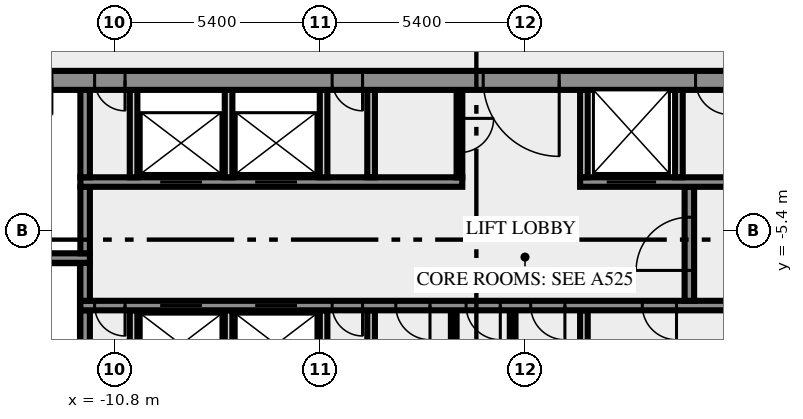
"""IFC4 building model, lengths in metres.
Left out: names, types, materials, properties, quantities, classifications, styles, units other than length and angle.
Written with IfcOpenShell. Run it as: python <this file> out.ifc"""

import sys

from ifc_helpers import new_model, si_unit, direction, frame, frame_2d, origin, place, context, subcontext, project, spatial, rectangle, extrude, element, fill, save


model = new_model("IFC4")
c1 = context("Model", 3, precision=1e-05, world=origin(), true_north=direction((0.0, 1.0)))
c2 = subcontext(c1, "Body", "Model", "MODEL_VIEW")
j1 = project(units=[si_unit("LENGTHUNIT", "METRE"), si_unit("PLANEANGLEUNIT", "RADIAN")], contexts=[c1])
p1 = place(None, origin())
s1 = spatial("IfcSite", under=j1, at=p1, CompositionType="ELEMENT")
p2 = place(p1, origin())
s2 = spatial("IfcBuilding", under=s1, at=p2, CompositionType="ELEMENT")
p3 = place(p2, frame((0.0, 0.0, 339.0)))
s3 = spatial("IfcBuildingStorey", under=s2, at=p3, CompositionType="ELEMENT", Elevation=339.0)
p4 = place(p3, frame((-11.575, -10.5, 0.0), z_axis=(0.0, 0.0, 1.0), x_axis=(0.0, 1.0, 0.0)))
e1 = element("IfcWall", 1, at=p4, inside=s3, PredefinedType="SHEAR", context=c2, shape_type="SweptSolid", body=[
    extrude(rectangle(XDim=3.0, YDim=0.25, at=frame_2d((1.5, 0.0))), origin(), (0.0, 0.0, 1.0), 3.65),
])
for number, where, z_axis, x_axis in (
    (2, (-10.3, -10.5, 0.0), (0.0, 0.0, 1.0), (0.0, 1.0, 0.0)),
    (3, (-7.8, -10.5, 0.0), (0.0, 0.0, 1.0), (0.0, 1.0, 0.0)),
    (4, (-5.3, -10.5, 0.0), (0.0, 0.0, 1.0), (0.0, 1.0, 0.0)),
    (5, (-4.05, -10.5, 0.0), (0.0, 0.0, 1.0), (0.0, 1.0, 0.0)),
):
    element("IfcWall", number, at=place(p3, frame(where, z_axis=z_axis, x_axis=x_axis)), inside=s3, PredefinedType="SOLIDWALL", context=c2, shape_type="SweptSolid", body=[
        extrude(rectangle(XDim=3.0, YDim=0.2, at=frame_2d((1.5, 0.0))), origin(), (0.0, 0.0, 1.0), 3.65),
    ])
for number, where, z_axis, x_axis in (
    (6, (-1.875, -10.5, 0.0), (0.0, 0.0, 1.0), (0.0, 1.0, 0.0)),
    (7, (-0.325, -10.5, 0.0), (0.0, 0.0, 1.0), (0.0, 1.0, 0.0)),
):
    element("IfcWall", number, at=place(p3, frame(where, z_axis=z_axis, x_axis=x_axis)), inside=s3, PredefinedType="PARTITIONING", context=c2, shape_type="SweptSolid", body=[
        extrude(rectangle(XDim=3.0, YDim=0.15, at=frame_2d((1.5, 0.0))), origin(), (0.0, 0.0, 1.0), 3.65),
    ])
p5 = place(p3, frame((1.55, -10.5, 0.0), z_axis=(0.0, 0.0, 1.0), x_axis=(0.0, 1.0, 0.0)))
e8 = element("IfcWall", 8, at=p5, inside=s3, PredefinedType="SOLIDWALL", context=c2, shape_type="SweptSolid", body=[
    extrude(rectangle(XDim=3.0, YDim=0.2, at=frame_2d((1.5, 0.0))), origin(), (0.0, 0.0, 1.0), 3.65),
])
p6 = place(p3, frame((11.7, -7.375, 0.0), z_axis=(0.0, 0.0, 1.0), x_axis=(-1.0, 0.0, 0.0)))
e9 = element("IfcWall", 9, at=p6, inside=s3, PredefinedType="SHEAR", context=c2, shape_type="SweptSolid", body=[
    extrude(rectangle(XDim=23.4, YDim=0.25, at=frame_2d((11.7, 0.0))), origin(), (0.0, 0.0, 1.0), 3.65),
])
p7 = place(p6, frame((22.225, 0.0, 0.0)))
e10 = element("IfcOpeningElement", 10, at=p7, cuts=e9, PredefinedType="OPENING", context=c2, shape_type="SweptSolid", body=[
    extrude(rectangle(XDim=0.8, YDim=2.1, at=frame_2d((0.4, 1.05))), frame((0.0, 0.135, 0.0), z_axis=(0.0, -1.0, 0.0), x_axis=(1.0, 0.0, 0.0)), (0.0, 0.0, 1.0), 0.27),
])
p8 = place(p6, frame((20.2, 0.0, 0.0)))
e11 = element("IfcOpeningElement", 11, at=p8, cuts=e9, PredefinedType="OPENING", context=c2, shape_type="SweptSolid", body=[
    extrude(rectangle(XDim=1.1, YDim=2.1, at=frame_2d((0.55, 1.05))), frame((0.0, 0.135, 0.0), z_axis=(0.0, -1.0, 0.0), x_axis=(1.0, 0.0, 0.0)), (0.0, 0.0, 1.0), 0.27),
])
p9 = place(p6, frame((17.7, 0.0, 0.0)))
e12 = element("IfcOpeningElement", 12, at=p9, cuts=e9, PredefinedType="OPENING", context=c2, shape_type="SweptSolid", body=[
    extrude(rectangle(XDim=1.1, YDim=2.1, at=frame_2d((0.55, 1.05))), frame((0.0, 0.135, 0.0), z_axis=(0.0, -1.0, 0.0), x_axis=(1.0, 0.0, 0.0)), (0.0, 0.0, 1.0), 0.27),
])
p10 = place(p6, frame((15.975, 0.0, 0.0)))
e13 = element("IfcOpeningElement", 13, at=p10, cuts=e9, PredefinedType="OPENING", context=c2, shape_type="SweptSolid", body=[
    extrude(rectangle(XDim=0.8, YDim=2.1, at=frame_2d((0.4, 1.05))), frame((0.0, 0.135, 0.0), z_axis=(0.0, -1.0, 0.0), x_axis=(1.0, 0.0, 0.0)), (0.0, 0.0, 1.0), 0.27),
])
p11 = place(p6, frame((14.2, 0.0, 0.0)))
e14 = element("IfcOpeningElement", 14, at=p11, cuts=e9, PredefinedType="OPENING", context=c2, shape_type="SweptSolid", body=[
    extrude(rectangle(XDim=0.9, YDim=2.1, at=frame_2d((0.45, 1.05))), frame((0.0, 0.135, 0.0), z_axis=(0.0, -1.0, 0.0), x_axis=(1.0, 0.0, 0.0)), (0.0, 0.0, 1.0), 0.27),
])
p12 = place(p6, frame((12.35, 0.0, 0.0)))
e15 = element("IfcOpeningElement", 15, at=p12, cuts=e9, PredefinedType="OPENING", context=c2, shape_type="SweptSolid", body=[
    extrude(rectangle(XDim=0.9, YDim=2.1, at=frame_2d((0.45, 1.05))), frame((0.0, 0.135, 0.0), z_axis=(0.0, -1.0, 0.0), x_axis=(1.0, 0.0, 0.0)), (0.0, 0.0, 1.0), 0.27),
])
p13 = place(p6, frame((10.65, 0.0, 0.0)))
e16 = element("IfcOpeningElement", 16, at=p13, cuts=e9, PredefinedType="OPENING", context=c2, shape_type="SweptSolid", body=[
    extrude(rectangle(XDim=0.9, YDim=2.1, at=frame_2d((0.45, 1.05))), frame((0.0, 0.135, 0.0), z_axis=(0.0, -1.0, 0.0), x_axis=(1.0, 0.0, 0.0)), (0.0, 0.0, 1.0), 0.27),
])
p14 = place(p6, frame((7.713, 0.0, 0.0)))
e17 = element("IfcOpeningElement", 17, at=p14, cuts=e9, PredefinedType="OPENING", context=c2, shape_type="SweptSolid", body=[
    extrude(rectangle(XDim=0.9, YDim=2.1, at=frame_2d((0.45, 1.05))), frame((0.0, 0.135, 0.0), z_axis=(0.0, -1.0, 0.0), x_axis=(1.0, 0.0, 0.0)), (0.0, 0.0, 1.0), 0.27),
])
p15 = place(p6, frame((4.15, 0.0, 0.0)))
e18 = element("IfcOpeningElement", 18, at=p15, cuts=e9, PredefinedType="OPENING", context=c2, shape_type="SweptSolid", body=[
    extrude(rectangle(XDim=0.9, YDim=2.1, at=frame_2d((0.45, 1.05))), frame((0.0, 0.135, 0.0), z_axis=(0.0, -1.0, 0.0), x_axis=(1.0, 0.0, 0.0)), (0.0, 0.0, 1.0), 0.27),
])
p16 = place(p6, frame((1.138, 0.0, 0.0)))
e19 = element("IfcOpeningElement", 19, at=p16, cuts=e9, PredefinedType="OPENING", context=c2, shape_type="SweptSolid", body=[
    extrude(rectangle(XDim=0.9, YDim=2.1, at=frame_2d((0.45, 1.05))), frame((0.0, 0.135, 0.0), z_axis=(0.0, -1.0, 0.0), x_axis=(1.0, 0.0, 0.0)), (0.0, 0.0, 1.0), 0.27),
])
p17 = place(p3, frame((-11.575, -7.25, 0.0), z_axis=(0.0, 0.0, 1.0), x_axis=(0.0, 1.0, 0.0)))
e20 = element("IfcWall", 20, at=p17, inside=s3, PredefinedType="SHEAR", context=c2, shape_type="SweptSolid", body=[
    extrude(rectangle(XDim=1.0, YDim=0.25, at=frame_2d((0.5, 0.0))), origin(), (0.0, 0.0, 1.0), 3.65),
])
p18 = place(p3, frame((4.325, -7.25, 0.0), z_axis=(0.0, 0.0, 1.0), x_axis=(0.0, 1.0, 0.0)))
e21 = element("IfcWall", 21, at=p18, inside=s3, PredefinedType="SHEAR", context=c2, shape_type="SweptSolid", body=[
    extrude(rectangle(XDim=3.0, YDim=0.25, at=frame_2d((1.5, 0.0))), origin(), (0.0, 0.0, 1.0), 3.65),
])
p19 = place(p18, frame((0.8, 0.0, 0.0)))
e22 = element("IfcOpeningElement", 22, at=p19, cuts=e21, PredefinedType="OPENING", context=c2, shape_type="SweptSolid", body=[
    extrude(rectangle(XDim=1.4, YDim=2.1, at=frame_2d((0.7, 1.05))), frame((0.0, 0.135, 0.0), z_axis=(0.0, -1.0, 0.0), x_axis=(1.0, 0.0, 0.0)), (0.0, 0.0, 1.0), 0.27),
])
p20 = place(p3, frame((-11.45, -6.125, 0.0), z_axis=(0.0, 0.0, 1.0), x_axis=(-1.0, 0.0, 0.0)))
e23 = element("IfcWall", 23, at=p20, inside=s3, PredefinedType="SHEAR", context=c2, shape_type="SweptSolid", body=[
    extrude(rectangle(XDim=8.05, YDim=0.25, at=frame_2d((4.025, 0.0))), origin(), (0.0, 0.0, 1.0), 3.65),
])
p21 = place(p20, frame((6.2, 0.0, 0.0)))
e24 = element("IfcOpeningElement", 24, at=p21, cuts=e23, PredefinedType="OPENING", context=c2, shape_type="SweptSolid", body=[
    extrude(rectangle(XDim=1.8, YDim=2.1, at=frame_2d((0.9, 1.05))), frame((0.0, 0.135, 0.0), z_axis=(0.0, -1.0, 0.0), x_axis=(1.0, 0.0, 0.0)), (0.0, 0.0, 1.0), 0.27),
])
p22 = place(p3, frame((-11.575, -6.0, 0.0), z_axis=(0.0, 0.0, 1.0), x_axis=(0.0, 1.0, 0.0)))
e25 = element("IfcWall", 25, at=p22, inside=s3, PredefinedType="SHEAR", context=c2, shape_type="SweptSolid", body=[
    extrude(rectangle(XDim=1.75, YDim=0.25, at=frame_2d((0.875, 0.0))), origin(), (0.0, 0.0, 1.0), 3.65),
])
p23 = place(p3, frame((-11.7, -4.125, 0.0), z_axis=(0.0, 0.0, 1.0), x_axis=(1.0, 0.0, 0.0)))
e26 = element("IfcWall", 26, at=p23, inside=s3, PredefinedType="SHEAR", context=c2, shape_type="SweptSolid", body=[
    extrude(rectangle(XDim=10.05, YDim=0.25, at=frame_2d((5.025, 0.0))), origin(), (0.0, 0.0, 1.0), 3.65),
])
p24 = place(p23, frame((2.1, 0.0, 0.0)))
e27 = element("IfcOpeningElement", 27, at=p24, cuts=e26, PredefinedType="OPENING", context=c2, shape_type="SweptSolid", body=[
    extrude(rectangle(XDim=1.1, YDim=2.1, at=frame_2d((0.55, 1.05))), frame((0.0, 0.135, 0.0), z_axis=(0.0, -1.0, 0.0), x_axis=(1.0, 0.0, 0.0)), (0.0, 0.0, 1.0), 0.27),
])
p25 = place(p23, frame((4.6, 0.0, 0.0)))
e28 = element("IfcOpeningElement", 28, at=p25, cuts=e26, PredefinedType="OPENING", context=c2, shape_type="SweptSolid", body=[
    extrude(rectangle(XDim=1.1, YDim=2.1, at=frame_2d((0.55, 1.05))), frame((0.0, 0.135, 0.0), z_axis=(0.0, -1.0, 0.0), x_axis=(1.0, 0.0, 0.0)), (0.0, 0.0, 1.0), 0.27),
])
p26 = place(p3, frame((1.45, -4.125, 0.0), z_axis=(0.0, 0.0, 1.0), x_axis=(1.0, 0.0, 0.0)))
e29 = element("IfcWall", 29, at=p26, inside=s3, PredefinedType="SHEAR", context=c2, shape_type="SweptSolid", body=[
    extrude(rectangle(XDim=10.25, YDim=0.25, at=frame_2d((5.125, 0.0))), origin(), (0.0, 0.0, 1.0), 3.65),
])
p27 = place(p26, frame((0.7, 0.0, 0.0)))
e30 = element("IfcOpeningElement", 30, at=p27, cuts=e29, PredefinedType="OPENING", context=c2, shape_type="SweptSolid", body=[
    extrude(rectangle(XDim=1.3, YDim=2.1, at=frame_2d((0.65, 1.05))), frame((0.0, 0.135, 0.0), z_axis=(0.0, -1.0, 0.0), x_axis=(1.0, 0.0, 0.0)), (0.0, 0.0, 1.0), 0.27),
])
p28 = place(p3, frame((-11.575, -4.0, 0.0), z_axis=(0.0, 0.0, 1.0), x_axis=(0.0, 1.0, 0.0)))
e31 = element("IfcWall", 31, at=p28, inside=s3, PredefinedType="SHEAR", context=c2, shape_type="SweptSolid", body=[
    extrude(rectangle(XDim=2.3, YDim=0.25, at=frame_2d((1.15, 0.0))), origin(), (0.0, 0.0, 1.0), 3.65),
])
for number, where, z_axis, x_axis in (
    (32, (-10.3, -4.0, 0.0), (0.0, 0.0, 1.0), (0.0, 1.0, 0.0)),
    (33, (-7.8, -4.0, 0.0), (0.0, 0.0, 1.0), (0.0, 1.0, 0.0)),
    (34, (-5.3, -4.0, 0.0), (0.0, 0.0, 1.0), (0.0, 1.0, 0.0)),
    (35, (-4.05, -4.0, 0.0), (0.0, 0.0, 1.0), (0.0, 1.0, 0.0)),
):
    element("IfcWall", number, at=place(p3, frame(where, z_axis=z_axis, x_axis=x_axis)), inside=s3, PredefinedType="SOLIDWALL", context=c2, shape_type="SweptSolid", body=[
        extrude(rectangle(XDim=2.3, YDim=0.2, at=frame_2d((1.15, 0.0))), origin(), (0.0, 0.0, 1.0), 3.65),
    ])
p29 = place(p3, frame((-1.725, -1.7, 0.0), z_axis=(0.0, 0.0, 1.0), x_axis=(0.0, -1.0, 0.0)))
e36 = element("IfcWall", 36, at=p29, inside=s3, PredefinedType="PARTITIONING", context=c2, shape_type="SweptSolid", body=[
    extrude(rectangle(XDim=2.3, YDim=0.15, at=frame_2d((1.15, 0.0))), origin(), (0.0, 0.0, 1.0), 3.65),
])
p30 = place(p29, frame((0.75, 0.0, 0.0)))
e37 = element("IfcOpeningElement", 37, at=p30, cuts=e36, PredefinedType="OPENING", context=c2, shape_type="SweptSolid", body=[
    extrude(rectangle(XDim=0.9, YDim=2.1, at=frame_2d((0.45, 1.05))), frame((0.0, 0.085, 0.0), z_axis=(0.0, -1.0, 0.0), x_axis=(1.0, 0.0, 0.0)), (0.0, 0.0, 1.0), 0.17),
])
for number, where, z_axis, x_axis in (
    (38, (1.55, -4.0, 0.0), (0.0, 0.0, 1.0), (0.0, 1.0, 0.0)),
    (39, (4.05, -4.0, 0.0), (0.0, 0.0, 1.0), (0.0, 1.0, 0.0)),
):
    element("IfcWall", number, at=place(p3, frame(where, z_axis=z_axis, x_axis=x_axis)), inside=s3, PredefinedType="SOLIDWALL", context=c2, shape_type="SweptSolid", body=[
        extrude(rectangle(XDim=2.3, YDim=0.2, at=frame_2d((1.15, 0.0))), origin(), (0.0, 0.0, 1.0), 3.65),
    ])
p31 = place(p3, frame((20.49, -1.45, 0.0), z_axis=(0.0, 0.0, 1.0), x_axis=(-1.0, 0.0, 0.0)))
e40 = element("IfcWall", 40, at=p31, inside=s3, PredefinedType="SHEAR", context=c2, shape_type="SweptSolid", body=[
    extrude(rectangle(XDim=40.98, YDim=0.5, at=frame_2d((20.49, 0.0))), origin(), (0.0, 0.0, 1.0), 3.65),
])
p32 = place(p31, frame((38.14, 0.0, 0.0)))
e41 = element("IfcOpeningElement", 41, at=p32, cuts=e40, PredefinedType="OPENING", context=c2, shape_type="SweptSolid", body=[
    extrude(rectangle(XDim=1.8, YDim=2.1, at=frame_2d((0.9, 1.05))), frame((0.0, 0.26, 0.0), z_axis=(0.0, -1.0, 0.0), x_axis=(1.0, 0.0, 0.0)), (0.0, 0.0, 1.0), 0.52),
])
p33 = place(p31, frame((36.728, 0.0, 0.0)))
e42 = element("IfcOpeningElement", 42, at=p33, cuts=e40, PredefinedType="OPENING", context=c2, shape_type="SweptSolid", body=[
    extrude(rectangle(XDim=0.8, YDim=2.1, at=frame_2d((0.4, 1.05))), frame((0.0, 0.26, 0.0), z_axis=(0.0, -1.0, 0.0), x_axis=(1.0, 0.0, 0.0)), (0.0, 0.0, 1.0), 0.52),
])
p34 = place(p31, frame((35.153, 0.0, 0.0)))
e43 = element("IfcOpeningElement", 43, at=p34, cuts=e40, PredefinedType="OPENING", context=c2, shape_type="SweptSolid", body=[
    extrude(rectangle(XDim=0.8, YDim=2.1, at=frame_2d((0.4, 1.05))), frame((0.0, 0.26, 0.0), z_axis=(0.0, -1.0, 0.0), x_axis=(1.0, 0.0, 0.0)), (0.0, 0.0, 1.0), 0.52),
])
p35 = place(p31, frame((32.94, 0.0, 0.0)))
e44 = element("IfcOpeningElement", 44, at=p35, cuts=e40, PredefinedType="OPENING", context=c2, shape_type="SweptSolid", body=[
    extrude(rectangle(XDim=0.9, YDim=2.1, at=frame_2d((0.45, 1.05))), frame((0.0, 0.26, 0.0), z_axis=(0.0, -1.0, 0.0), x_axis=(1.0, 0.0, 0.0)), (0.0, 0.0, 1.0), 0.52),
])
p36 = place(p31, frame((31.015, 0.0, 0.0)))
e45 = element("IfcOpeningElement", 45, at=p36, cuts=e40, PredefinedType="OPENING", context=c2, shape_type="SweptSolid", body=[
    extrude(rectangle(XDim=0.8, YDim=2.1, at=frame_2d((0.4, 1.05))), frame((0.0, 0.26, 0.0), z_axis=(0.0, -1.0, 0.0), x_axis=(1.0, 0.0, 0.0)), (0.0, 0.0, 1.0), 0.52),
])
p37 = place(p31, frame((24.765, 0.0, 0.0)))
e46 = element("IfcOpeningElement", 46, at=p37, cuts=e40, PredefinedType="OPENING", context=c2, shape_type="SweptSolid", body=[
    extrude(rectangle(XDim=0.8, YDim=2.1, at=frame_2d((0.4, 1.05))), frame((0.0, 0.26, 0.0), z_axis=(0.0, -1.0, 0.0), x_axis=(1.0, 0.0, 0.0)), (0.0, 0.0, 1.0), 0.52),
])
p38 = place(p31, frame((19.59, 0.0, 0.0)))
e47 = element("IfcOpeningElement", 47, at=p38, cuts=e40, PredefinedType="OPENING", context=c2, shape_type="SweptSolid", body=[
    extrude(rectangle(XDim=2.0, YDim=2.1, at=frame_2d((1.0, 1.05))), frame((0.0, 0.26, 0.0), z_axis=(0.0, -1.0, 0.0), x_axis=(1.0, 0.0, 0.0)), (0.0, 0.0, 1.0), 0.52),
])
p39 = place(p31, frame((15.103, 0.0, 0.0)))
e48 = element("IfcOpeningElement", 48, at=p39, cuts=e40, PredefinedType="OPENING", context=c2, shape_type="SweptSolid", body=[
    extrude(rectangle(XDim=0.9, YDim=2.1, at=frame_2d((0.45, 1.05))), frame((0.0, 0.26, 0.0), z_axis=(0.0, -1.0, 0.0), x_axis=(1.0, 0.0, 0.0)), (0.0, 0.0, 1.0), 0.52),
])
p40 = place(p31, frame((13.04, 0.0, 0.0)))
e49 = element("IfcOpeningElement", 49, at=p40, cuts=e40, PredefinedType="OPENING", context=c2, shape_type="SweptSolid", body=[
    extrude(rectangle(XDim=0.9, YDim=2.1, at=frame_2d((0.45, 1.05))), frame((0.0, 0.26, 0.0), z_axis=(0.0, -1.0, 0.0), x_axis=(1.0, 0.0, 0.0)), (0.0, 0.0, 1.0), 0.52),
])
p41 = place(p31, frame((10.177, 0.0, 0.0)))
e50 = element("IfcOpeningElement", 50, at=p41, cuts=e40, PredefinedType="OPENING", context=c2, shape_type="SweptSolid", body=[
    extrude(rectangle(XDim=0.9, YDim=2.1, at=frame_2d((0.45, 1.05))), frame((0.0, 0.26, 0.0), z_axis=(0.0, -1.0, 0.0), x_axis=(1.0, 0.0, 0.0)), (0.0, 0.0, 1.0), 0.52),
])
p42 = place(p31, frame((7.14, 0.0, 0.0)))
e51 = element("IfcOpeningElement", 51, at=p42, cuts=e40, PredefinedType="OPENING", context=c2, shape_type="SweptSolid", body=[
    extrude(rectangle(XDim=0.9, YDim=2.1, at=frame_2d((0.45, 1.05))), frame((0.0, 0.26, 0.0), z_axis=(0.0, -1.0, 0.0), x_axis=(1.0, 0.0, 0.0)), (0.0, 0.0, 1.0), 0.52),
])
p43 = place(p31, frame((4.19, 0.0, 0.0)))
e52 = element("IfcOpeningElement", 52, at=p43, cuts=e40, PredefinedType="OPENING", context=c2, shape_type="SweptSolid", body=[
    extrude(rectangle(XDim=0.9, YDim=2.1, at=frame_2d((0.45, 1.05))), frame((0.0, 0.26, 0.0), z_axis=(0.0, -1.0, 0.0), x_axis=(1.0, 0.0, 0.0)), (0.0, 0.0, 1.0), 0.52),
])
p44 = place(p31, frame((1.04, 0.0, 0.0)))
e53 = element("IfcOpeningElement", 53, at=p44, cuts=e40, PredefinedType="OPENING", context=c2, shape_type="SweptSolid", body=[
    extrude(rectangle(XDim=1.8, YDim=2.1, at=frame_2d((0.9, 1.05))), frame((0.0, 0.26, 0.0), z_axis=(0.0, -1.0, 0.0), x_axis=(1.0, 0.0, 0.0)), (0.0, 0.0, 1.0), 0.52),
])
p45 = place(p7, origin())
e54 = element("IfcDoor", 54, at=p45, inside=s3, OperationType="SINGLE_SWING_RIGHT", PredefinedType="DOOR", context=c2, shape_type="SweptSolid", body=[
    extrude(rectangle(XDim=0.8, YDim=2.1, at=frame_2d((0.4, 1.05))), frame((0.0, 0.025, 0.0), z_axis=(0.0, -1.0, 0.0), x_axis=(1.0, 0.0, 0.0)), (0.0, 0.0, 1.0), 0.05),
])
fill(e10, e54)
p46 = place(p8, origin())
e55 = element("IfcDoor", 55, at=p46, inside=s3, OperationType="DOUBLE_DOOR_SLIDING", PredefinedType="DOOR", context=c2, shape_type="SweptSolid", body=[
    extrude(rectangle(XDim=1.1, YDim=2.1, at=frame_2d((0.55, 1.05))), frame((0.0, 0.025, 0.0), z_axis=(0.0, -1.0, 0.0), x_axis=(1.0, 0.0, 0.0)), (0.0, 0.0, 1.0), 0.05),
])
fill(e11, e55)
p47 = place(p9, origin())
e56 = element("IfcDoor", 56, at=p47, inside=s3, OperationType="DOUBLE_DOOR_SLIDING", PredefinedType="DOOR", context=c2, shape_type="SweptSolid", body=[
    extrude(rectangle(XDim=1.1, YDim=2.1, at=frame_2d((0.55, 1.05))), frame((0.0, 0.025, 0.0), z_axis=(0.0, -1.0, 0.0), x_axis=(1.0, 0.0, 0.0)), (0.0, 0.0, 1.0), 0.05),
])
fill(e12, e56)
p48 = place(p10, origin())
e57 = element("IfcDoor", 57, at=p48, inside=s3, OperationType="SINGLE_SWING_RIGHT", PredefinedType="DOOR", context=c2, shape_type="SweptSolid", body=[
    extrude(rectangle(XDim=0.8, YDim=2.1, at=frame_2d((0.4, 1.05))), frame((0.0, 0.025, 0.0), z_axis=(0.0, -1.0, 0.0), x_axis=(1.0, 0.0, 0.0)), (0.0, 0.0, 1.0), 0.05),
])
fill(e13, e57)
p49 = place(p11, origin())
e58 = element("IfcDoor", 58, at=p49, inside=s3, OperationType="SINGLE_SWING_RIGHT", PredefinedType="DOOR", context=c2, shape_type="SweptSolid", body=[
    extrude(rectangle(XDim=0.9, YDim=2.1, at=frame_2d((0.45, 1.05))), frame((0.0, 0.025, 0.0), z_axis=(0.0, -1.0, 0.0), x_axis=(1.0, 0.0, 0.0)), (0.0, 0.0, 1.0), 0.05),
])
fill(e14, e58)
p50 = place(p12, origin())
e59 = element("IfcDoor", 59, at=p50, inside=s3, OperationType="SINGLE_SWING_RIGHT", PredefinedType="DOOR", context=c2, shape_type="SweptSolid", body=[
    extrude(rectangle(XDim=0.9, YDim=2.1, at=frame_2d((0.45, 1.05))), frame((0.0, 0.025, 0.0), z_axis=(0.0, -1.0, 0.0), x_axis=(1.0, 0.0, 0.0)), (0.0, 0.0, 1.0), 0.05),
])
fill(e15, e59)
p51 = place(p13, origin())
e60 = element("IfcDoor", 60, at=p51, inside=s3, OperationType="SINGLE_SWING_LEFT", PredefinedType="DOOR", context=c2, shape_type="SweptSolid", body=[
    extrude(rectangle(XDim=0.9, YDim=2.1, at=frame_2d((0.45, 1.05))), frame((0.0, 0.025, 0.0), z_axis=(0.0, -1.0, 0.0), x_axis=(1.0, 0.0, 0.0)), (0.0, 0.0, 1.0), 0.05),
])
fill(e16, e60)
p52 = place(p14, origin())
e61 = element("IfcDoor", 61, at=p52, inside=s3, OperationType="SINGLE_SWING_LEFT", PredefinedType="DOOR", context=c2, shape_type="SweptSolid", body=[
    extrude(rectangle(XDim=0.9, YDim=2.1, at=frame_2d((0.45, 1.05))), frame((0.0, 0.025, 0.0), z_axis=(0.0, -1.0, 0.0), x_axis=(1.0, 0.0, 0.0)), (0.0, 0.0, 1.0), 0.05),
])
fill(e17, e61)
p53 = place(p19, origin())
e62 = element("IfcDoor", 62, at=p53, inside=s3, OperationType="DOUBLE_DOOR_SINGLE_SWING", PredefinedType="DOOR", context=c2, shape_type="SweptSolid", body=[
    extrude(rectangle(XDim=1.4, YDim=2.1, at=frame_2d((0.7, 1.05))), frame((0.0, 0.025, 0.0), z_axis=(0.0, -1.0, 0.0), x_axis=(1.0, 0.0, 0.0)), (0.0, 0.0, 1.0), 0.05),
])
fill(e22, e62)
p54 = place(p24, origin())
e63 = element("IfcDoor", 63, at=p54, inside=s3, OperationType="DOUBLE_DOOR_SLIDING", PredefinedType="DOOR", context=c2, shape_type="SweptSolid", body=[
    extrude(rectangle(XDim=1.1, YDim=2.1, at=frame_2d((0.55, 1.05))), frame((0.0, 0.025, 0.0), z_axis=(0.0, -1.0, 0.0), x_axis=(1.0, 0.0, 0.0)), (0.0, 0.0, 1.0), 0.05),
])
fill(e27, e63)
p55 = place(p25, origin())
e64 = element("IfcDoor", 64, at=p55, inside=s3, OperationType="DOUBLE_DOOR_SLIDING", PredefinedType="DOOR", context=c2, shape_type="SweptSolid", body=[
    extrude(rectangle(XDim=1.1, YDim=2.1, at=frame_2d((0.55, 1.05))), frame((0.0, 0.025, 0.0), z_axis=(0.0, -1.0, 0.0), x_axis=(1.0, 0.0, 0.0)), (0.0, 0.0, 1.0), 0.05),
])
fill(e28, e64)
p56 = place(p27, origin())
e65 = element("IfcDoor", 65, at=p56, inside=s3, OperationType="DOUBLE_DOOR_SLIDING", PredefinedType="DOOR", context=c2, shape_type="SweptSolid", body=[
    extrude(rectangle(XDim=1.3, YDim=2.1, at=frame_2d((0.65, 1.05))), frame((0.0, 0.025, 0.0), z_axis=(0.0, -1.0, 0.0), x_axis=(1.0, 0.0, 0.0)), (0.0, 0.0, 1.0), 0.05),
])
fill(e30, e65)
p57 = place(p30, origin())
e66 = element("IfcDoor", 66, at=p57, inside=s3, OperationType="SINGLE_SWING_RIGHT", PredefinedType="DOOR", context=c2, shape_type="SweptSolid", body=[
    extrude(rectangle(XDim=0.9, YDim=2.1, at=frame_2d((0.45, 1.05))), frame((0.0, 0.025, 0.0), z_axis=(0.0, -1.0, 0.0), x_axis=(1.0, 0.0, 0.0)), (0.0, 0.0, 1.0), 0.05),
])
fill(e37, e66)
p58 = place(p36, origin())
e67 = element("IfcDoor", 67, at=p58, inside=s3, OperationType="SINGLE_SWING_RIGHT", PredefinedType="DOOR", context=c2, shape_type="SweptSolid", body=[
    extrude(rectangle(XDim=0.8, YDim=2.1, at=frame_2d((0.4, 1.05))), frame((0.0, 0.025, 0.0), z_axis=(0.0, -1.0, 0.0), x_axis=(1.0, 0.0, 0.0)), (0.0, 0.0, 1.0), 0.05),
])
fill(e45, e67)
p59 = place(p37, origin())
e68 = element("IfcDoor", 68, at=p59, inside=s3, OperationType="SINGLE_SWING_RIGHT", PredefinedType="DOOR", context=c2, shape_type="SweptSolid", body=[
    extrude(rectangle(XDim=0.8, YDim=2.1, at=frame_2d((0.4, 1.05))), frame((0.0, 0.025, 0.0), z_axis=(0.0, -1.0, 0.0), x_axis=(1.0, 0.0, 0.0)), (0.0, 0.0, 1.0), 0.05),
])
fill(e46, e68)
p60 = place(p38, origin())
e69 = element("IfcDoor", 69, at=p60, inside=s3, OperationType="DOUBLE_DOOR_SINGLE_SWING", PredefinedType="DOOR", context=c2, shape_type="SweptSolid", body=[
    extrude(rectangle(XDim=2.0, YDim=2.1, at=frame_2d((1.0, 1.05))), frame((0.0, 0.025, 0.0), z_axis=(0.0, -1.0, 0.0), x_axis=(1.0, 0.0, 0.0)), (0.0, 0.0, 1.0), 0.05),
])
fill(e47, e69)
p61 = place(p39, origin())
e70 = element("IfcDoor", 70, at=p61, inside=s3, OperationType="SINGLE_SWING_LEFT", PredefinedType="DOOR", context=c2, shape_type="SweptSolid", body=[
    extrude(rectangle(XDim=0.9, YDim=2.1, at=frame_2d((0.45, 1.05))), frame((0.0, 0.025, 0.0), z_axis=(0.0, -1.0, 0.0), x_axis=(1.0, 0.0, 0.0)), (0.0, 0.0, 1.0), 0.05),
])
fill(e48, e70)
save(model, sys.argv[1])
